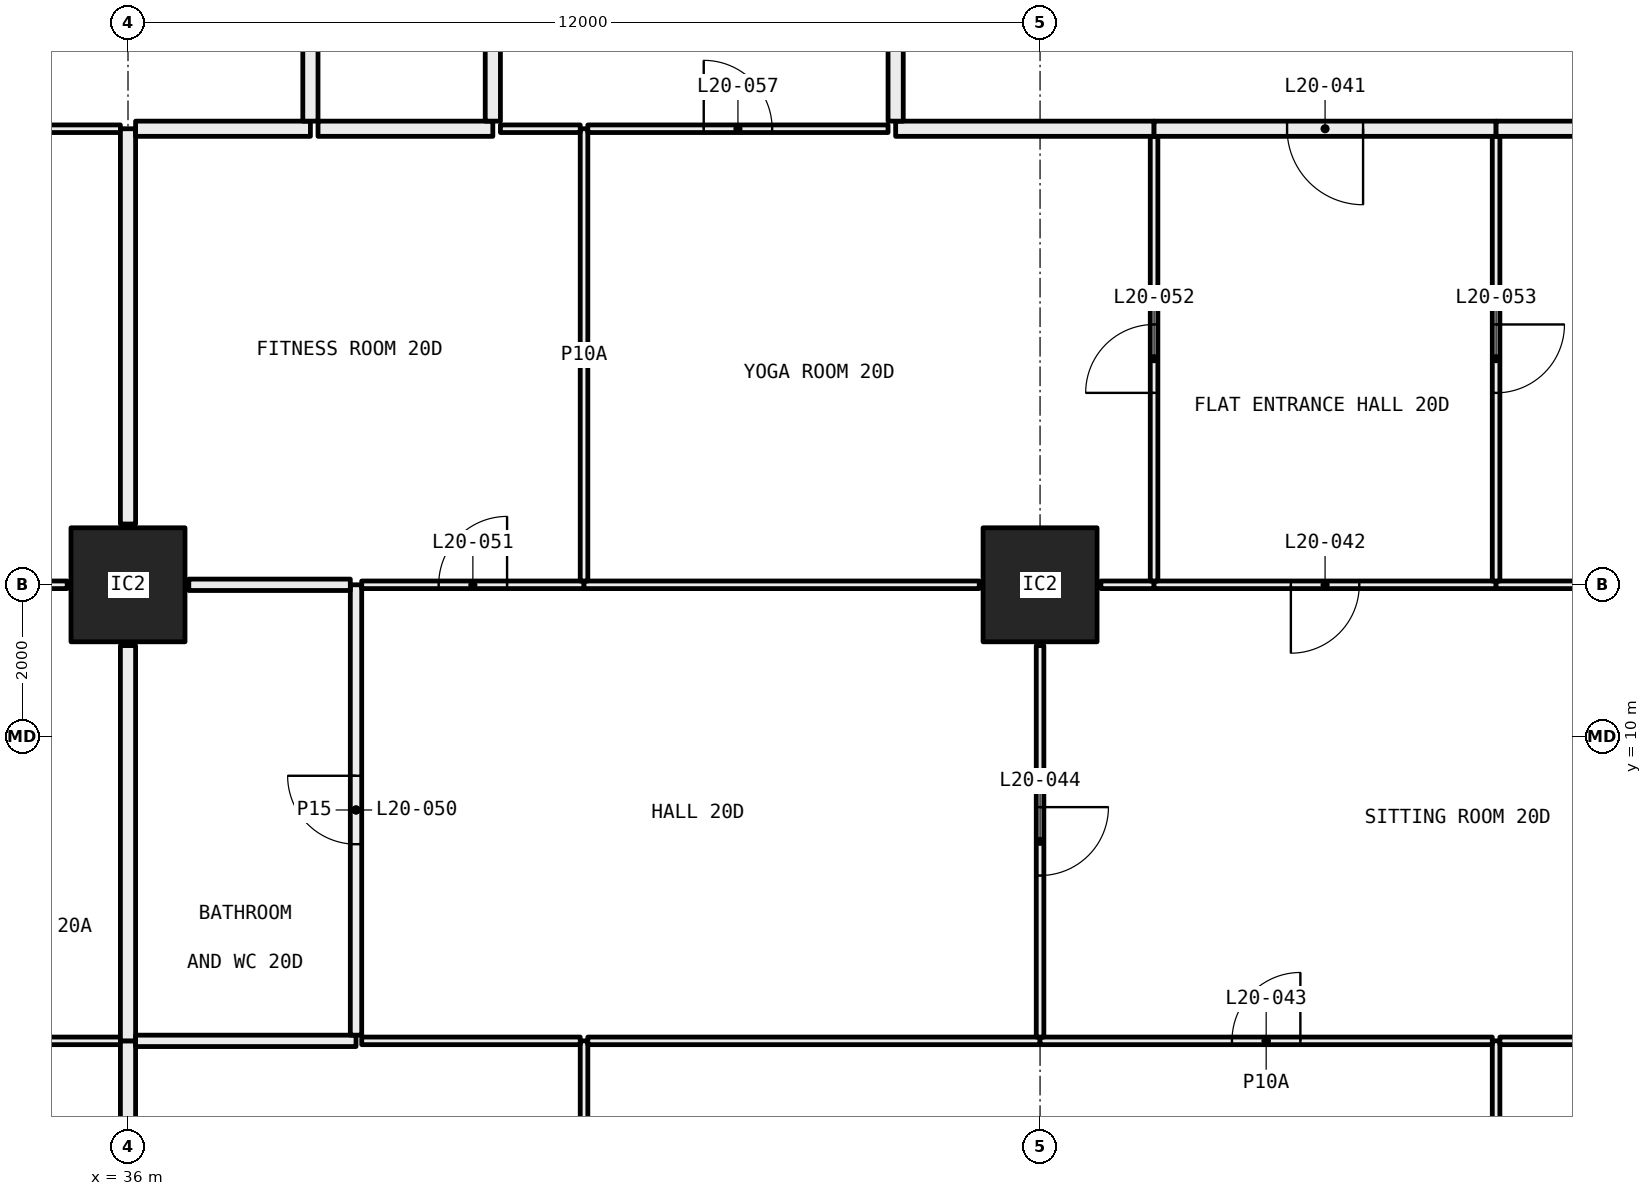
"""IFC4 building model, lengths in metres.
Left out: names, types, materials, properties, quantities, classifications, styles, units other than length and angle.
Written with IfcOpenShell. Run it as: python <this file> out.ifc"""

import sys

from ifc_helpers import new_model, si_unit, direction, frame, frame_2d, origin, origin_2d, place, context, subcontext, project, spatial, rectangle, hollow_rectangle, extrude, element, fill, save


model = new_model("IFC4")
c1 = context("Model", 3, precision=1e-05, world=origin(), true_north=direction((0.0, 1.0)))
c2 = subcontext(c1, "Body", "Model", "MODEL_VIEW")
j1 = project(units=[si_unit("LENGTHUNIT", "METRE"), si_unit("PLANEANGLEUNIT", "RADIAN")], contexts=[c1])
p1 = place(None, origin())
s1 = spatial("IfcSite", under=j1, at=p1, CompositionType="ELEMENT")
p2 = place(p1, origin())
s2 = spatial("IfcBuilding", under=s1, at=p2, CompositionType="ELEMENT")
p3 = place(p2, frame((0.0, 0.0, 81.75)))
s3 = spatial("IfcBuildingStorey", under=s2, at=p3, CompositionType="ELEMENT", Elevation=81.75)
for number, where, z_axis, x_axis in (
    (1, (36.0, 12.0, 0.0), (0.0, 0.0, 1.0), (1.0, 0.0, 0.0)),
    (2, (48.0, 12.0, 0.0), (0.0, 0.0, 1.0), (1.0, 0.0, 0.0)),
):
    element("IfcColumn", number, at=place(p3, frame(where, z_axis=z_axis, x_axis=x_axis)), inside=s3, PredefinedType="COLUMN", context=c2, shape_type="SweptSolid", body=[
        extrude(hollow_rectangle(XDim=1.5, YDim=1.5, WallThickness=0.065, at=origin_2d()), origin(), (0.0, 0.0, 1.0), 3.05),
    ])
p4 = place(p3, frame((35.9, 6.0, 0.0), z_axis=(0.0, 0.0, 1.0), x_axis=(-1.0, 0.0, 0.0)))
e3 = element("IfcWall", 3, at=p4, inside=s3, PredefinedType="PARTITIONING", context=c2, shape_type="SweptSolid", body=[
    extrude(rectangle(XDim=2.9, YDim=0.1, at=frame_2d((1.45, 0.0))), origin(), (0.0, 0.0, 1.0), 3.05),
])
p5 = place(p3, frame((36.0, 0.72, 0.0), z_axis=(0.0, 0.0, 1.0), x_axis=(0.0, 1.0, 0.0)))
e4 = element("IfcWall", 4, at=p5, inside=s3, PredefinedType="PARTITIONING", context=c2, shape_type="SweptSolid", body=[
    extrude(rectangle(XDim=5.28, YDim=0.2, at=frame_2d((2.64, 0.0))), origin(), (0.0, 0.0, 1.0), 2.45),
])
p6 = place(p3, frame((35.2, 12.0, 0.0), z_axis=(0.0, 0.0, 1.0), x_axis=(-1.0, 0.0, 0.0)))
e5 = element("IfcWall", 5, at=p6, inside=s3, PredefinedType="PARTITIONING", context=c2, shape_type="SweptSolid", body=[
    extrude(rectangle(XDim=2.15, YDim=0.1, at=frame_2d((1.075, 0.0))), origin(), (0.0, 0.0, 1.0), 2.45),
])
p7 = place(p3, frame((36.0, 6.0, 0.0), z_axis=(0.0, 0.0, 1.0), x_axis=(0.0, 1.0, 0.0)))
e6 = element("IfcWall", 6, at=p7, inside=s3, PredefinedType="PARTITIONING", context=c2, shape_type="SweptSolid", body=[
    extrude(rectangle(XDim=5.2, YDim=0.2, at=frame_2d((2.6, 0.0))), origin(), (0.0, 0.0, 1.0), 2.45),
])
p8 = place(p3, frame((35.9, 18.0, 0.0), z_axis=(0.0, 0.0, 1.0), x_axis=(-1.0, 0.0, 0.0)))
e7 = element("IfcWall", 7, at=p8, inside=s3, PredefinedType="PARTITIONING", context=c2, shape_type="SweptSolid", body=[
    extrude(rectangle(XDim=1.4, YDim=0.1, at=frame_2d((0.7, 0.0))), origin(), (0.0, 0.0, 1.0), 3.05),
])
p9 = place(p3, frame((36.0, 12.8, 0.0), z_axis=(0.0, 0.0, 1.0), x_axis=(0.0, 1.0, 0.0)))
e8 = element("IfcWall", 8, at=p9, inside=s3, PredefinedType="PARTITIONING", context=c2, shape_type="SweptSolid", body=[
    extrude(rectangle(XDim=5.2, YDim=0.2, at=frame_2d((2.6, 0.0))), origin(), (0.0, 0.0, 1.0), 2.45),
])
p10 = place(p3, frame((36.1, 18.0, 0.0), z_axis=(0.0, 0.0, 1.0), x_axis=(1.0, 0.0, 0.0)))
e9 = element("IfcWall", 9, at=p10, inside=s3, PredefinedType="PARTITIONING", context=c2, shape_type="SweptSolid", body=[
    extrude(rectangle(XDim=2.3, YDim=0.2, at=frame_2d((1.15, 0.0))), origin(), (0.0, 0.0, 1.0), 3.05),
])
p11 = place(p3, frame((38.4, 18.1, 0.0), z_axis=(0.0, 0.0, 1.0), x_axis=(0.0, 1.0, 0.0)))
e10 = element("IfcWall", 10, at=p11, inside=s3, PredefinedType="PARTITIONING", context=c2, shape_type="SweptSolid", body=[
    extrude(rectangle(XDim=6.2, YDim=0.2, at=frame_2d((3.1, 0.0))), origin(), (0.0, 0.0, 1.0), 2.45),
])
p12 = place(p3, frame((42.0, 0.72, 0.0), z_axis=(0.0, 0.0, 1.0), x_axis=(0.0, 1.0, 0.0)))
e11 = element("IfcWall", 11, at=p12, inside=s3, PredefinedType="PARTITIONING", context=c2, shape_type="SweptSolid", body=[
    extrude(rectangle(XDim=5.28, YDim=0.1, at=frame_2d((2.64, 0.0))), origin(), (0.0, 0.0, 1.0), 3.05),
])
p13 = place(p12, frame((2.19, 0.0, 0.0)))
e12 = element("IfcOpeningElement", 12, at=p13, cuts=e11, PredefinedType="OPENING", context=c2, shape_type="SweptSolid", body=[
    extrude(rectangle(XDim=0.9, YDim=2.1, at=frame_2d((0.45, 1.05))), frame((0.0, 0.06, 0.0), z_axis=(0.0, -1.0, 0.0), x_axis=(1.0, 0.0, 0.0)), (0.0, 0.0, 1.0), 0.12),
])
p14 = place(p3, frame((39.0, 6.0, 0.0), z_axis=(0.0, 0.0, 1.0), x_axis=(-1.0, 0.0, 0.0)))
e13 = element("IfcWall", 13, at=p14, inside=s3, PredefinedType="PARTITIONING", context=c2, shape_type="SweptSolid", body=[
    extrude(rectangle(XDim=2.9, YDim=0.15, at=frame_2d((1.45, 0.0))), origin(), (0.0, 0.0, 1.0), 3.05),
])
p15 = place(p3, frame((41.95, 6.0, 0.0), z_axis=(0.0, 0.0, 1.0), x_axis=(-1.0, 0.0, 0.0)))
e14 = element("IfcWall", 14, at=p15, inside=s3, PredefinedType="PARTITIONING", context=c2, shape_type="SweptSolid", body=[
    extrude(rectangle(XDim=2.875, YDim=0.1, at=frame_2d((1.438, 0.0))), origin(), (0.0, 0.0, 1.0), 3.05),
])
p16 = place(p3, frame((54.0, 0.72, 0.0), z_axis=(0.0, 0.0, 1.0), x_axis=(0.0, 1.0, 0.0)))
e15 = element("IfcWall", 15, at=p16, inside=s3, PredefinedType="PARTITIONING", context=c2, shape_type="SweptSolid", body=[
    extrude(rectangle(XDim=5.28, YDim=0.1, at=frame_2d((2.64, 0.0))), origin(), (0.0, 0.0, 1.0), 3.05),
])
p17 = place(p16, frame((2.19, 0.0, 0.0)))
e16 = element("IfcOpeningElement", 16, at=p17, cuts=e15, PredefinedType="OPENING", context=c2, shape_type="SweptSolid", body=[
    extrude(rectangle(XDim=0.9, YDim=2.1, at=frame_2d((0.45, 1.05))), frame((0.0, 0.06, 0.0), z_axis=(0.0, -1.0, 0.0), x_axis=(1.0, 0.0, 0.0)), (0.0, 0.0, 1.0), 0.12),
])
p18 = place(p3, frame((48.0, 6.0, 0.0), z_axis=(0.0, 0.0, 1.0), x_axis=(-1.0, 0.0, 0.0)))
e17 = element("IfcWall", 17, at=p18, inside=s3, PredefinedType="PARTITIONING", context=c2, shape_type="SweptSolid", body=[
    extrude(rectangle(XDim=5.95, YDim=0.1, at=frame_2d((2.975, 0.0))), origin(), (0.0, 0.0, 1.0), 2.45),
])
p19 = place(p3, frame((53.95, 6.0, 0.0), z_axis=(0.0, 0.0, 1.0), x_axis=(-1.0, 0.0, 0.0)))
e18 = element("IfcWall", 18, at=p19, inside=s3, PredefinedType="PARTITIONING", context=c2, shape_type="SweptSolid", body=[
    extrude(rectangle(XDim=5.95, YDim=0.1, at=frame_2d((2.975, 0.0))), origin(), (0.0, 0.0, 1.0), 2.45),
])
p20 = place(p19, frame((2.525, 0.0, 0.0)))
e19 = element("IfcOpeningElement", 19, at=p20, cuts=e18, PredefinedType="OPENING", context=c2, shape_type="SweptSolid", body=[
    extrude(rectangle(XDim=0.9, YDim=2.1, at=frame_2d((0.45, 1.05))), frame((0.0, 0.06, 0.0), z_axis=(0.0, -1.0, 0.0), x_axis=(1.0, 0.0, 0.0)), (0.0, 0.0, 1.0), 0.12),
])
p21 = place(p3, frame((57.0, 6.0, 0.0), z_axis=(0.0, 0.0, 1.0), x_axis=(-1.0, 0.0, 0.0)))
e20 = element("IfcWall", 20, at=p21, inside=s3, PredefinedType="PARTITIONING", context=c2, shape_type="SweptSolid", body=[
    extrude(rectangle(XDim=2.95, YDim=0.1, at=frame_2d((1.475, 0.0))), origin(), (0.0, 0.0, 1.0), 3.05),
])
p22 = place(p3, frame((39.0, 6.075, 0.0), z_axis=(0.0, 0.0, 1.0), x_axis=(0.0, 1.0, 0.0)))
e21 = element("IfcWall", 21, at=p22, inside=s3, PredefinedType="PARTITIONING", context=c2, shape_type="SweptSolid", body=[
    extrude(rectangle(XDim=5.925, YDim=0.15, at=frame_2d((2.962, 0.0))), origin(), (0.0, 0.0, 1.0), 2.45),
])
p23 = place(p22, frame((2.512, 0.0, 0.0)))
e22 = element("IfcOpeningElement", 22, at=p23, cuts=e21, PredefinedType="OPENING", context=c2, shape_type="SweptSolid", body=[
    extrude(rectangle(XDim=0.9, YDim=2.1, at=frame_2d((0.45, 1.05))), frame((0.0, 0.085, 0.0), z_axis=(0.0, -1.0, 0.0), x_axis=(1.0, 0.0, 0.0)), (0.0, 0.0, 1.0), 0.17),
])
p24 = place(p3, frame((38.925, 12.0, 0.0), z_axis=(0.0, 0.0, 1.0), x_axis=(-1.0, 0.0, 0.0)))
e23 = element("IfcWall", 23, at=p24, inside=s3, PredefinedType="PARTITIONING", context=c2, shape_type="SweptSolid", body=[
    extrude(rectangle(XDim=2.125, YDim=0.15, at=frame_2d((1.062, 0.0))), origin(), (0.0, 0.0, 1.0), 2.45),
])
p25 = place(p3, frame((48.0, 6.05, 0.0), z_axis=(0.0, 0.0, 1.0), x_axis=(0.0, 1.0, 0.0)))
e24 = element("IfcWall", 24, at=p25, inside=s3, PredefinedType="PARTITIONING", context=c2, shape_type="SweptSolid", body=[
    extrude(rectangle(XDim=5.15, YDim=0.1, at=frame_2d((2.575, 0.0))), origin(), (0.0, 0.0, 1.0), 2.45),
])
p26 = place(p25, frame((2.125, 0.0, 0.0)))
e25 = element("IfcOpeningElement", 25, at=p26, cuts=e24, PredefinedType="OPENING", context=c2, shape_type="SweptSolid", body=[
    extrude(rectangle(XDim=0.9, YDim=2.1, at=frame_2d((0.45, 1.05))), frame((0.0, 0.06, 0.0), z_axis=(0.0, -1.0, 0.0), x_axis=(1.0, 0.0, 0.0)), (0.0, 0.0, 1.0), 0.12),
])
p27 = place(p3, frame((42.0, 12.0, 0.0), z_axis=(0.0, 0.0, 1.0), x_axis=(-1.0, 0.0, 0.0)))
e26 = element("IfcWall", 26, at=p27, inside=s3, PredefinedType="PARTITIONING", context=c2, shape_type="SweptSolid", body=[
    extrude(rectangle(XDim=2.925, YDim=0.1, at=frame_2d((1.462, 0.0))), origin(), (0.0, 0.0, 1.0), 2.45),
])
p28 = place(p27, frame((1.012, 0.0, 0.0)))
e27 = element("IfcOpeningElement", 27, at=p28, cuts=e26, PredefinedType="OPENING", context=c2, shape_type="SweptSolid", body=[
    extrude(rectangle(XDim=0.9, YDim=2.1, at=frame_2d((0.45, 1.05))), frame((0.0, 0.06, 0.0), z_axis=(0.0, -1.0, 0.0), x_axis=(1.0, 0.0, 0.0)), (0.0, 0.0, 1.0), 0.12),
])
p29 = place(p3, frame((47.2, 12.0, 0.0), z_axis=(0.0, 0.0, 1.0), x_axis=(-1.0, 0.0, 0.0)))
e28 = element("IfcWall", 28, at=p29, inside=s3, PredefinedType="PARTITIONING", context=c2, shape_type="SweptSolid", body=[
    extrude(rectangle(XDim=5.2, YDim=0.1, at=frame_2d((2.6, 0.0))), origin(), (0.0, 0.0, 1.0), 2.45),
])
p30 = place(p3, frame((49.5, 12.0, 0.0), z_axis=(0.0, 0.0, 1.0), x_axis=(-1.0, 0.0, 0.0)))
e29 = element("IfcWall", 29, at=p30, inside=s3, PredefinedType="PARTITIONING", context=c2, shape_type="SweptSolid", body=[
    extrude(rectangle(XDim=0.7, YDim=0.1, at=frame_2d((0.35, 0.0))), origin(), (0.0, 0.0, 1.0), 2.45),
])
p31 = place(p3, frame((54.0, 12.0, 0.0), z_axis=(0.0, 0.0, 1.0), x_axis=(-1.0, 0.0, 0.0)))
e30 = element("IfcWall", 30, at=p31, inside=s3, PredefinedType="PARTITIONING", context=c2, shape_type="SweptSolid", body=[
    extrude(rectangle(XDim=4.5, YDim=0.1, at=frame_2d((2.25, 0.0))), origin(), (0.0, 0.0, 1.0), 2.45),
])
p32 = place(p31, frame((1.8, 0.0, 0.0)))
e31 = element("IfcOpeningElement", 31, at=p32, cuts=e30, PredefinedType="OPENING", context=c2, shape_type="SweptSolid", body=[
    extrude(rectangle(XDim=0.9, YDim=2.1, at=frame_2d((0.45, 1.05))), frame((0.0, 0.06, 0.0), z_axis=(0.0, -1.0, 0.0), x_axis=(1.0, 0.0, 0.0)), (0.0, 0.0, 1.0), 0.12),
])
p33 = place(p3, frame((56.95, 12.0, 0.0), z_axis=(0.0, 0.0, 1.0), x_axis=(-1.0, 0.0, 0.0)))
e32 = element("IfcWall", 32, at=p33, inside=s3, PredefinedType="PARTITIONING", context=c2, shape_type="SweptSolid", body=[
    extrude(rectangle(XDim=2.95, YDim=0.1, at=frame_2d((1.475, 0.0))), origin(), (0.0, 0.0, 1.0), 2.45),
])
p34 = place(p3, frame((42.0, 12.05, 0.0), z_axis=(0.0, 0.0, 1.0), x_axis=(0.0, 1.0, 0.0)))
e33 = element("IfcWall", 33, at=p34, inside=s3, PredefinedType="PARTITIONING", context=c2, shape_type="SweptSolid", body=[
    extrude(rectangle(XDim=5.95, YDim=0.1, at=frame_2d((2.975, 0.0))), origin(), (0.0, 0.0, 1.0), 2.45),
])
p35 = place(p3, frame((41.95, 18.0, 0.0), z_axis=(0.0, 0.0, 1.0), x_axis=(-1.0, 0.0, 0.0)))
e34 = element("IfcWall", 34, at=p35, inside=s3, PredefinedType="PARTITIONING", context=c2, shape_type="SweptSolid", body=[
    extrude(rectangle(XDim=1.05, YDim=0.1, at=frame_2d((0.525, 0.0))), origin(), (0.0, 0.0, 1.0), 3.05),
])
p36 = place(p3, frame((40.8, 18.0, 0.0), z_axis=(0.0, 0.0, 1.0), x_axis=(-1.0, 0.0, 0.0)))
e35 = element("IfcWall", 35, at=p36, inside=s3, PredefinedType="PARTITIONING", context=c2, shape_type="SweptSolid", body=[
    extrude(rectangle(XDim=2.3, YDim=0.2, at=frame_2d((1.15, 0.0))), origin(), (0.0, 0.0, 1.0), 3.05),
])
p37 = place(p3, frame((49.5, 12.05, 0.0), z_axis=(0.0, 0.0, 1.0), x_axis=(0.0, 1.0, 0.0)))
e36 = element("IfcWall", 36, at=p37, inside=s3, PredefinedType="PARTITIONING", context=c2, shape_type="SweptSolid", body=[
    extrude(rectangle(XDim=5.85, YDim=0.1, at=frame_2d((2.925, 0.0))), origin(), (0.0, 0.0, 1.0), 2.45),
])
p38 = place(p37, frame((2.475, 0.0, 0.0)))
e37 = element("IfcOpeningElement", 37, at=p38, cuts=e36, PredefinedType="OPENING", context=c2, shape_type="SweptSolid", body=[
    extrude(rectangle(XDim=0.9, YDim=2.1, at=frame_2d((0.45, 1.05))), frame((0.0, 0.06, 0.0), z_axis=(0.0, -1.0, 0.0), x_axis=(1.0, 0.0, 0.0)), (0.0, 0.0, 1.0), 0.12),
])
p39 = place(p3, frame((46.0, 18.0, 0.0), z_axis=(0.0, 0.0, 1.0), x_axis=(-1.0, 0.0, 0.0)))
e38 = element("IfcWall", 38, at=p39, inside=s3, PredefinedType="PARTITIONING", context=c2, shape_type="SweptSolid", body=[
    extrude(rectangle(XDim=3.95, YDim=0.1, at=frame_2d((1.975, 0.0))), origin(), (0.0, 0.0, 1.0), 3.05),
])
p40 = place(p39, frame((1.525, 0.0, 0.0)))
e39 = element("IfcOpeningElement", 39, at=p40, cuts=e38, PredefinedType="OPENING", context=c2, shape_type="SweptSolid", body=[
    extrude(rectangle(XDim=0.9, YDim=2.1, at=frame_2d((0.45, 1.05))), frame((0.0, 0.06, 0.0), z_axis=(0.0, -1.0, 0.0), x_axis=(1.0, 0.0, 0.0)), (0.0, 0.0, 1.0), 0.12),
])
p41 = place(p3, frame((49.5, 18.0, 0.0), z_axis=(0.0, 0.0, 1.0), x_axis=(-1.0, 0.0, 0.0)))
e40 = element("IfcWall", 40, at=p41, inside=s3, PredefinedType="PARTITIONING", context=c2, shape_type="SweptSolid", body=[
    extrude(rectangle(XDim=3.4, YDim=0.2, at=frame_2d((1.7, 0.0))), origin(), (0.0, 0.0, 1.0), 3.05),
])
p42 = place(p3, frame((54.0, 12.05, 0.0), z_axis=(0.0, 0.0, 1.0), x_axis=(0.0, 1.0, 0.0)))
e41 = element("IfcWall", 41, at=p42, inside=s3, PredefinedType="PARTITIONING", context=c2, shape_type="SweptSolid", body=[
    extrude(rectangle(XDim=5.85, YDim=0.1, at=frame_2d((2.925, 0.0))), origin(), (0.0, 0.0, 1.0), 2.45),
])
p43 = place(p42, frame((2.475, 0.0, 0.0)))
e42 = element("IfcOpeningElement", 42, at=p43, cuts=e41, PredefinedType="OPENING", context=c2, shape_type="SweptSolid", body=[
    extrude(rectangle(XDim=0.9, YDim=2.1, at=frame_2d((0.45, 1.05))), frame((0.0, 0.06, 0.0), z_axis=(0.0, -1.0, 0.0), x_axis=(1.0, 0.0, 0.0)), (0.0, 0.0, 1.0), 0.12),
])
p44 = place(p3, frame((54.0, 18.0, 0.0), z_axis=(0.0, 0.0, 1.0), x_axis=(-1.0, 0.0, 0.0)))
e43 = element("IfcWall", 43, at=p44, inside=s3, PredefinedType="PARTITIONING", context=c2, shape_type="SweptSolid", body=[
    extrude(rectangle(XDim=4.5, YDim=0.2, at=frame_2d((2.25, 0.0))), origin(), (0.0, 0.0, 1.0), 3.05),
])
p45 = place(p44, frame((1.75, 0.0, 0.0)))
e44 = element("IfcOpeningElement", 44, at=p45, cuts=e43, PredefinedType="OPENING", context=c2, shape_type="SweptSolid", body=[
    extrude(rectangle(XDim=1.0, YDim=2.1, at=frame_2d((0.5, 1.05))), frame((0.0, 0.11, 0.0), z_axis=(0.0, -1.0, 0.0), x_axis=(1.0, 0.0, 0.0)), (0.0, 0.0, 1.0), 0.22),
])
p46 = place(p3, frame((61.9, 18.0, 0.0), z_axis=(0.0, 0.0, 1.0), x_axis=(-1.0, 0.0, 0.0)))
e45 = element("IfcWall", 45, at=p46, inside=s3, PredefinedType="PARTITIONING", context=c2, shape_type="SweptSolid", body=[
    extrude(rectangle(XDim=7.9, YDim=0.2, at=frame_2d((3.95, 0.0))), origin(), (0.0, 0.0, 1.0), 3.05),
])
p47 = place(p3, frame((40.8, 23.9, 0.0), z_axis=(0.0, 0.0, 1.0), x_axis=(0.0, -1.0, 0.0)))
e46 = element("IfcWall", 46, at=p47, inside=s3, PredefinedType="PARTITIONING", context=c2, shape_type="SweptSolid", body=[
    extrude(rectangle(XDim=5.8, YDim=0.2, at=frame_2d((2.9, 0.0))), origin(), (0.0, 0.0, 1.0), 3.05),
])
p48 = place(p3, frame((46.1, 18.1, 0.0), z_axis=(0.0, 0.0, 1.0), x_axis=(0.0, 1.0, 0.0)))
e47 = element("IfcWall", 47, at=p48, inside=s3, PredefinedType="PARTITIONING", context=c2, shape_type="SweptSolid", body=[
    extrude(rectangle(XDim=6.2, YDim=0.2, at=frame_2d((3.1, 0.0))), origin(), (0.0, 0.0, 1.0), 2.45),
])
p49 = place(p45, origin())
e48 = element("IfcDoor", 48, at=p49, inside=s3, OperationType="SINGLE_SWING_RIGHT", PredefinedType="DOOR", context=c2, shape_type="SweptSolid", body=[
    extrude(rectangle(XDim=1.0, YDim=2.1, at=frame_2d((0.5, 1.05))), frame((0.0, 0.025, 0.0), z_axis=(0.0, -1.0, 0.0), x_axis=(1.0, 0.0, 0.0)), (0.0, 0.0, 1.0), 0.05),
])
fill(e44, e48)
p50 = place(p32, origin())
e49 = element("IfcDoor", 49, at=p50, inside=s3, OperationType="SINGLE_SWING_LEFT", PredefinedType="DOOR", context=c2, shape_type="SweptSolid", body=[
    extrude(rectangle(XDim=0.9, YDim=2.1, at=frame_2d((0.45, 1.05))), frame((0.0, 0.025, 0.0), z_axis=(0.0, -1.0, 0.0), x_axis=(1.0, 0.0, 0.0)), (0.0, 0.0, 1.0), 0.05),
])
fill(e31, e49)
p51 = place(p20, frame((0.9, 0.0, 0.0), x_axis=(-1.0, 0.0, 0.0)))
e50 = element("IfcDoor", 50, at=p51, inside=s3, OperationType="SINGLE_SWING_LEFT", PredefinedType="DOOR", context=c2, shape_type="SweptSolid", body=[
    extrude(rectangle(XDim=0.9, YDim=2.1, at=frame_2d((0.45, 1.05))), frame((0.0, 0.025, 0.0), z_axis=(0.0, -1.0, 0.0), x_axis=(1.0, 0.0, 0.0)), (0.0, 0.0, 1.0), 0.05),
])
fill(e19, e50)
p52 = place(p26, frame((0.9, 0.0, 0.0), x_axis=(-1.0, 0.0, 0.0)))
e51 = element("IfcDoor", 51, at=p52, inside=s3, OperationType="SINGLE_SWING_RIGHT", PredefinedType="DOOR", context=c2, shape_type="SweptSolid", body=[
    extrude(rectangle(XDim=0.9, YDim=2.1, at=frame_2d((0.45, 1.05))), frame((0.0, 0.025, 0.0), z_axis=(0.0, -1.0, 0.0), x_axis=(1.0, 0.0, 0.0)), (0.0, 0.0, 1.0), 0.05),
])
fill(e25, e51)
p53 = place(p23, origin())
e52 = element("IfcDoor", 52, at=p53, inside=s3, OperationType="SINGLE_SWING_LEFT", PredefinedType="DOOR", context=c2, shape_type="SweptSolid", body=[
    extrude(rectangle(XDim=0.9, YDim=2.1, at=frame_2d((0.45, 1.05))), frame((0.0, 0.025, 0.0), z_axis=(0.0, -1.0, 0.0), x_axis=(1.0, 0.0, 0.0)), (0.0, 0.0, 1.0), 0.05),
])
fill(e22, e52)
p54 = place(p28, frame((0.9, 0.0, 0.0), x_axis=(-1.0, 0.0, 0.0)))
e53 = element("IfcDoor", 53, at=p54, inside=s3, OperationType="SINGLE_SWING_LEFT", PredefinedType="DOOR", context=c2, shape_type="SweptSolid", body=[
    extrude(rectangle(XDim=0.9, YDim=2.1, at=frame_2d((0.45, 1.05))), frame((0.0, 0.025, 0.0), z_axis=(0.0, -1.0, 0.0), x_axis=(1.0, 0.0, 0.0)), (0.0, 0.0, 1.0), 0.05),
])
fill(e27, e53)
p55 = place(p38, origin())
e54 = element("IfcDoor", 54, at=p55, inside=s3, OperationType="SINGLE_SWING_RIGHT", PredefinedType="DOOR", context=c2, shape_type="SweptSolid", body=[
    extrude(rectangle(XDim=0.9, YDim=2.1, at=frame_2d((0.45, 1.05))), frame((0.0, 0.025, 0.0), z_axis=(0.0, -1.0, 0.0), x_axis=(1.0, 0.0, 0.0)), (0.0, 0.0, 1.0), 0.05),
])
fill(e37, e54)
p56 = place(p43, frame((0.9, 0.0, 0.0), x_axis=(-1.0, 0.0, 0.0)))
e55 = element("IfcDoor", 55, at=p56, inside=s3, OperationType="SINGLE_SWING_RIGHT", PredefinedType="DOOR", context=c2, shape_type="SweptSolid", body=[
    extrude(rectangle(XDim=0.9, YDim=2.1, at=frame_2d((0.45, 1.05))), frame((0.0, 0.025, 0.0), z_axis=(0.0, -1.0, 0.0), x_axis=(1.0, 0.0, 0.0)), (0.0, 0.0, 1.0), 0.05),
])
fill(e42, e55)
p57 = place(p40, frame((0.9, 0.0, 0.0), x_axis=(-1.0, 0.0, 0.0)))
e56 = element("IfcDoor", 56, at=p57, inside=s3, OperationType="SINGLE_SWING_RIGHT", PredefinedType="DOOR", context=c2, shape_type="SweptSolid", body=[
    extrude(rectangle(XDim=0.9, YDim=2.1, at=frame_2d((0.45, 1.05))), frame((0.0, 0.025, 0.0), z_axis=(0.0, -1.0, 0.0), x_axis=(1.0, 0.0, 0.0)), (0.0, 0.0, 1.0), 0.05),
])
fill(e39, e56)
save(model, sys.argv[1])
